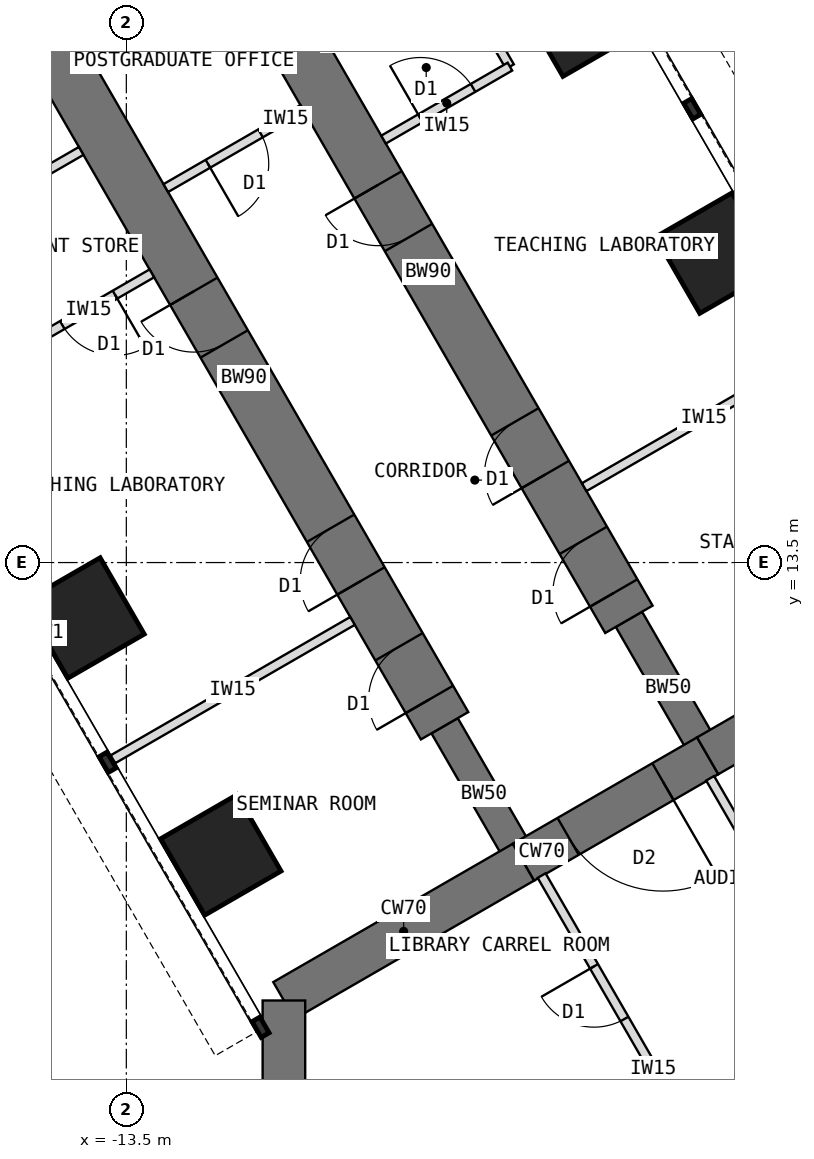
"""IFC4 building model, lengths in metres.
Left out: names, types, materials, properties, quantities, classifications, styles, units other than length and angle.
Written with IfcOpenShell. Run it as: python <this file> out.ifc"""

import sys

from ifc_helpers import new_model, si_unit, direction, frame, frame_2d, origin, origin_2d, place, context, subcontext, project, spatial, rectangle, extrude, element, fill, save


model = new_model("IFC4")
c1 = context("Model", 3, precision=1e-05, world=origin(), true_north=direction((0.0, 1.0)))
c2 = subcontext(c1, "Body", "Model", "MODEL_VIEW")
j1 = project(units=[si_unit("LENGTHUNIT", "METRE"), si_unit("PLANEANGLEUNIT", "RADIAN")], contexts=[c1])
p1 = place(None, origin())
s1 = spatial("IfcSite", under=j1, at=p1, CompositionType="ELEMENT")
p2 = place(p1, origin())
s2 = spatial("IfcBuilding", under=s1, at=p2, CompositionType="ELEMENT")
p3 = place(p2, frame((0.0, 0.0, 56.5)))
s3 = spatial("IfcBuildingStorey", under=s2, at=p3, CompositionType="ELEMENT", Elevation=56.5)
p4 = place(p3, frame((0.0, 12.596, 0.0), z_axis=(0.0, 0.0, 1.0), x_axis=(-0.866011268655, -0.500024481964, 0.0)))
e1 = element("IfcWall", 1, at=p4, inside=s3, PredefinedType="SHEAR", context=c2, shape_type="SweptSolid", body=[
    extrude(rectangle(XDim=4.548, YDim=0.7, at=frame_2d((2.274, 0.0))), origin(), (0.0, 0.0, 1.0), 4.0),
])
p5 = place(p3, frame((-3.939, 10.322, 0.0), z_axis=(0.0, 0.0, 1.0), x_axis=(-0.866019471182, -0.500010275428, 0.0)))
e2 = element("IfcWall", 2, at=p5, inside=s3, PredefinedType="SHEAR", context=c2, shape_type="SweptSolid", body=[
    extrude(rectangle(XDim=3.5, YDim=0.7, at=frame_2d((1.75, 0.0))), origin(), (0.0, 0.0, 1.0), 4.0),
])
p6 = place(p5, frame((0.85, 0.0, 0.0)))
e3 = element("IfcOpeningElement", 3, at=p6, cuts=e2, PredefinedType="OPENING", context=c2, shape_type="SweptSolid", body=[
    extrude(rectangle(XDim=1.8, YDim=2.1, at=frame_2d((0.9, 1.05))), frame((0.0, 0.36, 0.0), z_axis=(0.0, -1.0, 0.0), x_axis=(1.0, 0.0, 0.0)), (0.0, 0.0, 1.0), 0.72),
])
p7 = place(p3, frame((-6.97, 8.572, 0.0), z_axis=(0.0, 0.0, 1.0), x_axis=(-0.866034513004, -0.499984222037, 0.0)))
e4 = element("IfcWall", 4, at=p7, inside=s3, PredefinedType="SHEAR", context=c2, shape_type="SweptSolid", body=[
    extrude(rectangle(XDim=4.548, YDim=0.7, at=frame_2d((2.274, 0.0))), origin(), (0.0, 0.0, 1.0), 4.0),
])
p8 = place(p3, frame((-10.908, 6.298, 0.0), z_axis=(0.0, 0.0, 1.0), x_axis=(0.0, -1.0, 0.0)))
e5 = element("IfcWall", 5, at=p8, inside=s3, PredefinedType="SHEAR", context=c2, shape_type="SweptSolid", body=[
    extrude(rectangle(XDim=12.596, YDim=0.7, at=frame_2d((6.298, 0.0))), origin(), (0.0, 0.0, 1.0), 4.0),
])
p9 = place(p3, frame((-6.97, 8.572, 0.0), z_axis=(0.0, 0.0, 1.0), x_axis=(-0.499988811324, 0.866031863473, 0.0)))
e6 = element("IfcWall", 6, at=p9, inside=s3, PredefinedType="SHEAR", context=c2, shape_type="SweptSolid", body=[
    extrude(rectangle(XDim=2.592, YDim=0.5, at=frame_2d((1.296, 0.0))), origin(), (0.0, 0.0, 1.0), 4.0),
])
p10 = place(p3, frame((-8.266, 10.816, 0.0), z_axis=(0.0, 0.0, 1.0), x_axis=(-0.499996231654, 0.866027579429, 0.0)))
e7 = element("IfcWall", 7, at=p10, inside=s3, PredefinedType="SHEAR", context=c2, shape_type="SweptSolid", body=[
    extrude(rectangle(XDim=13.2, YDim=0.9, at=frame_2d((6.6, 0.0))), origin(), (0.0, 0.0, 1.0), 4.0),
])
p11 = place(p10, frame((0.5, 0.0, 0.0)))
e8 = element("IfcOpeningElement", 8, at=p11, cuts=e7, PredefinedType="OPENING", context=c2, shape_type="SweptSolid", body=[
    extrude(rectangle(XDim=1.0, YDim=2.1, at=frame_2d((0.5, 1.05))), frame((0.0, 0.46, 0.0), z_axis=(0.0, -1.0, 0.0), x_axis=(1.0, 0.0, 0.0)), (0.0, 0.0, 1.0), 0.92),
])
p12 = place(p10, frame((2.75, 0.0, 0.0)))
e9 = element("IfcOpeningElement", 9, at=p12, cuts=e7, PredefinedType="OPENING", context=c2, shape_type="SweptSolid", body=[
    extrude(rectangle(XDim=1.0, YDim=2.1, at=frame_2d((0.5, 1.05))), frame((0.0, 0.46, 0.0), z_axis=(0.0, -1.0, 0.0), x_axis=(1.0, 0.0, 0.0)), (0.0, 0.0, 1.0), 0.92),
])
p13 = place(p10, frame((7.25, 0.0, 0.0)))
e10 = element("IfcOpeningElement", 10, at=p13, cuts=e7, PredefinedType="OPENING", context=c2, shape_type="SweptSolid", body=[
    extrude(rectangle(XDim=1.0, YDim=2.1, at=frame_2d((0.5, 1.05))), frame((0.0, 0.46, 0.0), z_axis=(0.0, -1.0, 0.0), x_axis=(1.0, 0.0, 0.0)), (0.0, 0.0, 1.0), 0.92),
])
p14 = place(p3, frame((-3.939, 10.322, 0.0), z_axis=(0.0, 0.0, 1.0), x_axis=(-0.499918158782, 0.866072649678, 0.0)))
e11 = element("IfcWall", 11, at=p14, inside=s3, PredefinedType="SHEAR", context=c2, shape_type="SweptSolid", body=[
    extrude(rectangle(XDim=2.592, YDim=0.5, at=frame_2d((1.296, 0.0))), origin(), (0.0, 0.0, 1.0), 4.0),
])
p15 = place(p3, frame((-5.234, 12.566, 0.0), z_axis=(0.0, 0.0, 1.0), x_axis=(-0.500010103361, 0.866019570528, 0.0)))
e12 = element("IfcWall", 12, at=p15, inside=s3, PredefinedType="SHEAR", context=c2, shape_type="SweptSolid", body=[
    extrude(rectangle(XDim=13.2, YDim=0.9, at=frame_2d((6.6, 0.0))), origin(), (0.0, 0.0, 1.0), 4.0),
])
p16 = place(p15, frame((0.5, 0.0, 0.0)))
e13 = element("IfcOpeningElement", 13, at=p16, cuts=e12, PredefinedType="OPENING", context=c2, shape_type="SweptSolid", body=[
    extrude(rectangle(XDim=1.0, YDim=2.1, at=frame_2d((0.5, 1.05))), frame((0.0, 0.46, 0.0), z_axis=(0.0, -1.0, 0.0), x_axis=(1.0, 0.0, 0.0)), (0.0, 0.0, 1.0), 0.92),
])
p17 = place(p15, frame((2.75, 0.0, 0.0)))
e14 = element("IfcOpeningElement", 14, at=p17, cuts=e12, PredefinedType="OPENING", context=c2, shape_type="SweptSolid", body=[
    extrude(rectangle(XDim=1.0, YDim=2.1, at=frame_2d((0.5, 1.05))), frame((0.0, 0.46, 0.0), z_axis=(0.0, -1.0, 0.0), x_axis=(1.0, 0.0, 0.0)), (0.0, 0.0, 1.0), 0.92),
])
p18 = place(p15, frame((7.25, 0.0, 0.0)))
e15 = element("IfcOpeningElement", 15, at=p18, cuts=e12, PredefinedType="OPENING", context=c2, shape_type="SweptSolid", body=[
    extrude(rectangle(XDim=1.0, YDim=2.1, at=frame_2d((0.5, 1.05))), frame((0.0, 0.46, 0.0), z_axis=(0.0, -1.0, 0.0), x_axis=(1.0, 0.0, 0.0)), (0.0, 0.0, 1.0), 0.92),
])
for number, where, z_axis, x_axis in (
    (16, (-11.946, 8.691, 0.0), (0.0, 0.0, 1.0), (0.866, 0.5, 0.0)),
    (17, (-14.196, 12.588, 0.0), (0.0, 0.0, 1.0), (0.866, 0.5, 0.0)),
    (18, (-3.804, 18.588, 0.0), (0.0, 0.0, 1.0), (0.866, 0.5, 0.0)),
    (19, (-6.054, 22.486, 0.0), (0.0, 0.0, 1.0), (0.866, 0.5, 0.0)),
):
    element("IfcColumn", number, at=place(p3, frame(where, z_axis=z_axis, x_axis=x_axis)), inside=s3, PredefinedType="COLUMN", context=c2, shape_type="SweptSolid", body=[
        extrude(rectangle(XDim=1.45, YDim=1.45, at=origin_2d()), origin(), (0.0, 0.0, 1.0), 4.0),
    ])
p19 = place(p3, frame((-9.78, 12.54, 0.0), z_axis=(0.0, 0.0, 1.0), x_axis=(-0.866035472144, -0.499982560684, 0.0)))
e20 = element("IfcWall", 20, at=p19, inside=s3, PredefinedType="PARTITIONING", context=c2, shape_type="SweptSolid", body=[
    extrude(rectangle(XDim=4.55, YDim=0.15, at=frame_2d((2.275, 0.0))), origin(), (0.0, 0.0, 1.0), 3.8),
])
p20 = place(p3, frame((-13.08, 18.256, 0.0), z_axis=(0.0, 0.0, 1.0), x_axis=(-0.866024647952, -0.500001309137, 0.0)))
e21 = element("IfcWall", 21, at=p20, inside=s3, PredefinedType="PARTITIONING", context=c2, shape_type="SweptSolid", body=[
    extrude(rectangle(XDim=2.4, YDim=0.15, at=frame_2d((1.2, 0.0))), origin(), (0.0, 0.0, 1.0), 3.8),
])
p21 = place(p20, frame((0.7, 0.0, 0.0)))
e22 = element("IfcOpeningElement", 22, at=p21, cuts=e21, PredefinedType="OPENING", context=c2, shape_type="SweptSolid", body=[
    extrude(rectangle(XDim=1.0, YDim=2.1, at=frame_2d((0.5, 1.05))), frame((0.0, 0.085, 0.0), z_axis=(0.0, -1.0, 0.0), x_axis=(1.0, 0.0, 0.0)), (0.0, 0.0, 1.0), 0.17),
])
p22 = place(p3, frame((-14.243, 20.269, 0.0), z_axis=(0.0, 0.0, 1.0), x_axis=(-0.866006032174, -0.500033551112, 0.0)))
e23 = element("IfcWall", 23, at=p22, inside=s3, PredefinedType="PARTITIONING", context=c2, shape_type="SweptSolid", body=[
    extrude(rectangle(XDim=2.4, YDim=0.15, at=frame_2d((1.2, 0.0))), origin(), (0.0, 0.0, 1.0), 3.8),
])
p23 = place(p3, frame((-5.97, 14.74, 0.0), z_axis=(0.0, 0.0, 1.0), x_axis=(0.866035472144, 0.499982560684, 0.0)))
e24 = element("IfcWall", 24, at=p23, inside=s3, PredefinedType="PARTITIONING", context=c2, shape_type="SweptSolid", body=[
    extrude(rectangle(XDim=4.55, YDim=0.15, at=frame_2d((2.275, 0.0))), origin(), (0.0, 0.0, 1.0), 3.8),
])
p24 = place(p3, frame((-7.191, 21.656, 0.0), z_axis=(0.0, 0.0, 1.0), x_axis=(-0.500077600433, 0.865980596518, 0.0)))
e25 = element("IfcWall", 25, at=p24, inside=s3, PredefinedType="PARTITIONING", context=c2, shape_type="SweptSolid", body=[
    extrude(rectangle(XDim=2.4, YDim=0.15, at=frame_2d((1.2, 0.0))), origin(), (0.0, 0.0, 1.0), 3.8),
])
p25 = place(p3, frame((-9.27, 20.456, 0.0), z_axis=(0.0, 0.0, 1.0), x_axis=(0.866006032174, 0.500033551112, 0.0)))
e26 = element("IfcWall", 26, at=p25, inside=s3, PredefinedType="PARTITIONING", context=c2, shape_type="SweptSolid", body=[
    extrude(rectangle(XDim=2.4, YDim=0.15, at=frame_2d((1.2, 0.0))), origin(), (0.0, 0.0, 1.0), 3.8),
])
p26 = place(p25, frame((0.7, 0.0, 0.0)))
e27 = element("IfcOpeningElement", 27, at=p26, cuts=e26, PredefinedType="OPENING", context=c2, shape_type="SweptSolid", body=[
    extrude(rectangle(XDim=1.0, YDim=2.1, at=frame_2d((0.5, 1.05))), frame((0.0, 0.085, 0.0), z_axis=(0.0, -1.0, 0.0), x_axis=(1.0, 0.0, 0.0)), (0.0, 0.0, 1.0), 0.17),
])
p27 = place(p3, frame((-4.436, 4.483, 0.0), z_axis=(0.0, 0.0, 1.0), x_axis=(-0.500017246033, 0.866015446554, 0.0)))
e28 = element("IfcWall", 28, at=p27, inside=s3, PredefinedType="PARTITIONING", context=c2, shape_type="SweptSolid", body=[
    extrude(rectangle(XDim=4.469, YDim=0.15, at=frame_2d((2.234, 0.0))), origin(), (0.0, 0.0, 1.0), 3.8),
])
p28 = place(p27, frame((1.744, 0.0, 0.0)))
e29 = element("IfcOpeningElement", 29, at=p28, cuts=e28, PredefinedType="OPENING", context=c2, shape_type="SweptSolid", body=[
    extrude(rectangle(XDim=1.0, YDim=2.1, at=frame_2d((0.5, 1.05))), frame((0.0, 0.085, 0.0), z_axis=(0.0, -1.0, 0.0), x_axis=(1.0, 0.0, 0.0)), (0.0, 0.0, 1.0), 0.17),
])
p29 = place(p3, frame((-3.898, 9.952, 0.0), z_axis=(0.0, 0.0, 1.0), x_axis=(0.499999927604, -0.866025445582, 0.0)))
e30 = element("IfcWall", 30, at=p29, inside=s3, PredefinedType="PARTITIONING", context=c2, shape_type="SweptSolid", body=[
    extrude(rectangle(XDim=4.468, YDim=0.15, at=frame_2d((2.234, 0.0))), origin(), (0.0, 0.0, 1.0), 3.8),
])
p30 = place(p29, frame((1.724, 0.0, 0.0)))
e31 = element("IfcOpeningElement", 31, at=p30, cuts=e30, PredefinedType="OPENING", context=c2, shape_type="SweptSolid", body=[
    extrude(rectangle(XDim=1.0, YDim=2.1, at=frame_2d((0.5, 1.05))), frame((0.0, 0.085, 0.0), z_axis=(0.0, -1.0, 0.0), x_axis=(1.0, 0.0, 0.0)), (0.0, 0.0, 1.0), 0.17),
])
p31 = place(p3, frame((-10.599, 20.958, 0.0), z_axis=(0.0, 0.0, 1.0), x_axis=(-0.866021400173, -0.500006934395, 0.0)))
e32 = element("IfcWall", 32, at=p31, inside=s3, PredefinedType="PARTITIONING", context=c2, shape_type="SweptSolid", body=[
    extrude(rectangle(XDim=2.6, YDim=0.15, at=frame_2d((1.3, 0.0))), origin(), (0.0, 0.0, 1.0), 3.8),
])
p32 = place(p31, frame((0.8, 0.0, 0.0)))
e33 = element("IfcOpeningElement", 33, at=p32, cuts=e32, PredefinedType="OPENING", context=c2, shape_type="SweptSolid", body=[
    extrude(rectangle(XDim=1.0, YDim=2.1, at=frame_2d((0.5, 1.05))), frame((0.0, 0.085, 0.0), z_axis=(0.0, -1.0, 0.0), x_axis=(1.0, 0.0, 0.0)), (0.0, 0.0, 1.0), 0.17),
])
p33 = place(p6, origin())
e34 = element("IfcDoor", 34, at=p33, inside=s3, OperationType="DOUBLE_DOOR_DOUBLE_SWING", PredefinedType="DOOR", context=c2, shape_type="SweptSolid", body=[
    extrude(rectangle(XDim=1.72, YDim=2.06, at=frame_2d((0.9, 1.03))), frame((0.0, 0.025, 0.0), z_axis=(0.0, -1.0, 0.0), x_axis=(1.0, 0.0, 0.0)), (0.0, 0.0, 1.0), 0.05),
    extrude(rectangle(XDim=0.04, YDim=2.1, at=frame_2d((0.02, 1.05))), frame((0.0, 0.35, 0.0), z_axis=(0.0, -1.0, 0.0), x_axis=(1.0, 0.0, 0.0)), (0.0, 0.0, 1.0), 0.699),
    extrude(rectangle(XDim=0.04, YDim=2.1, at=frame_2d((1.78, 1.05))), frame((0.0, 0.35, 0.0), z_axis=(0.0, -1.0, 0.0), x_axis=(1.0, 0.0, 0.0)), (0.0, 0.0, 1.0), 0.699),
    extrude(rectangle(XDim=1.72, YDim=0.04, at=frame_2d((0.9, 2.08))), frame((0.0, 0.35, 0.0), z_axis=(0.0, -1.0, 0.0), x_axis=(1.0, 0.0, 0.0)), (0.0, 0.0, 1.0), 0.699),
])
fill(e3, e34)
p34 = place(p21, origin())
e35 = element("IfcDoor", 35, at=p34, inside=s3, OperationType="SINGLE_SWING_LEFT", PredefinedType="DOOR", context=c2, shape_type="SweptSolid", body=[
    extrude(rectangle(XDim=1.0, YDim=2.1, at=frame_2d((0.5, 1.05))), frame((0.0, 0.025, 0.0), z_axis=(0.0, -1.0, 0.0), x_axis=(1.0, 0.0, 0.0)), (0.0, 0.0, 1.0), 0.05),
])
fill(e22, e35)
p35 = place(p26, origin())
e36 = element("IfcDoor", 36, at=p35, inside=s3, OperationType="SINGLE_SWING_LEFT", PredefinedType="DOOR", context=c2, shape_type="SweptSolid", body=[
    extrude(rectangle(XDim=1.0, YDim=2.1, at=frame_2d((0.5, 1.05))), frame((0.0, 0.025, 0.0), z_axis=(0.0, -1.0, 0.0), x_axis=(1.0, 0.0, 0.0)), (0.0, 0.0, 1.0), 0.05),
])
fill(e27, e36)
p36 = place(p28, origin())
e37 = element("IfcDoor", 37, at=p36, inside=s3, OperationType="SINGLE_SWING_RIGHT", PredefinedType="DOOR", context=c2, shape_type="SweptSolid", body=[
    extrude(rectangle(XDim=1.0, YDim=2.1, at=frame_2d((0.5, 1.05))), frame((0.0, 0.025, 0.0), z_axis=(0.0, -1.0, 0.0), x_axis=(1.0, 0.0, 0.0)), (0.0, 0.0, 1.0), 0.05),
])
fill(e29, e37)
p37 = place(p32, origin())
e38 = element("IfcDoor", 38, at=p37, inside=s3, OperationType="SINGLE_SWING_RIGHT", PredefinedType="DOOR", context=c2, shape_type="SweptSolid", body=[
    extrude(rectangle(XDim=1.0, YDim=2.1, at=frame_2d((0.5, 1.05))), frame((0.0, 0.025, 0.0), z_axis=(0.0, -1.0, 0.0), x_axis=(1.0, 0.0, 0.0)), (0.0, 0.0, 1.0), 0.05),
])
fill(e33, e38)
p38 = place(p11, origin())
e39 = element("IfcDoor", 39, at=p38, inside=s3, OperationType="SINGLE_SWING_LEFT", PredefinedType="DOOR", context=c2, shape_type="SweptSolid", body=[
    extrude(rectangle(XDim=0.92, YDim=2.06, at=frame_2d((0.5, 1.03))), frame((0.0, 0.025, 0.0), z_axis=(0.0, -1.0, 0.0), x_axis=(1.0, 0.0, 0.0)), (0.0, 0.0, 1.0), 0.05),
    extrude(rectangle(XDim=0.04, YDim=2.1, at=frame_2d((0.02, 1.05))), frame((0.0, 0.45, 0.0), z_axis=(0.0, -1.0, 0.0), x_axis=(1.0, 0.0, 0.0)), (0.0, 0.0, 1.0), 0.899),
    extrude(rectangle(XDim=0.04, YDim=2.1, at=frame_2d((0.98, 1.05))), frame((0.0, 0.45, 0.0), z_axis=(0.0, -1.0, 0.0), x_axis=(1.0, 0.0, 0.0)), (0.0, 0.0, 1.0), 0.899),
    extrude(rectangle(XDim=0.92, YDim=0.04, at=frame_2d((0.5, 2.08))), frame((0.0, 0.45, 0.0), z_axis=(0.0, -1.0, 0.0), x_axis=(1.0, 0.0, 0.0)), (0.0, 0.0, 1.0), 0.899),
])
fill(e8, e39)
p39 = place(p12, origin())
e40 = element("IfcDoor", 40, at=p39, inside=s3, OperationType="SINGLE_SWING_LEFT", PredefinedType="DOOR", context=c2, shape_type="SweptSolid", body=[
    extrude(rectangle(XDim=0.92, YDim=2.06, at=frame_2d((0.5, 1.03))), frame((0.0, 0.025, 0.0), z_axis=(0.0, -1.0, 0.0), x_axis=(1.0, 0.0, 0.0)), (0.0, 0.0, 1.0), 0.05),
    extrude(rectangle(XDim=0.04, YDim=2.1, at=frame_2d((0.02, 1.05))), frame((0.0, 0.45, 0.0), z_axis=(0.0, -1.0, 0.0), x_axis=(1.0, 0.0, 0.0)), (0.0, 0.0, 1.0), 0.899),
    extrude(rectangle(XDim=0.04, YDim=2.1, at=frame_2d((0.98, 1.05))), frame((0.0, 0.45, 0.0), z_axis=(0.0, -1.0, 0.0), x_axis=(1.0, 0.0, 0.0)), (0.0, 0.0, 1.0), 0.899),
    extrude(rectangle(XDim=0.92, YDim=0.04, at=frame_2d((0.5, 2.08))), frame((0.0, 0.45, 0.0), z_axis=(0.0, -1.0, 0.0), x_axis=(1.0, 0.0, 0.0)), (0.0, 0.0, 1.0), 0.899),
])
fill(e9, e40)
p40 = place(p13, origin())
e41 = element("IfcDoor", 41, at=p40, inside=s3, OperationType="SINGLE_SWING_RIGHT", PredefinedType="DOOR", context=c2, shape_type="SweptSolid", body=[
    extrude(rectangle(XDim=0.92, YDim=2.06, at=frame_2d((0.5, 1.03))), frame((0.0, 0.025, 0.0), z_axis=(0.0, -1.0, 0.0), x_axis=(1.0, 0.0, 0.0)), (0.0, 0.0, 1.0), 0.05),
    extrude(rectangle(XDim=0.04, YDim=2.1, at=frame_2d((0.02, 1.05))), frame((0.0, 0.45, 0.0), z_axis=(0.0, -1.0, 0.0), x_axis=(1.0, 0.0, 0.0)), (0.0, 0.0, 1.0), 0.899),
    extrude(rectangle(XDim=0.04, YDim=2.1, at=frame_2d((0.98, 1.05))), frame((0.0, 0.45, 0.0), z_axis=(0.0, -1.0, 0.0), x_axis=(1.0, 0.0, 0.0)), (0.0, 0.0, 1.0), 0.899),
    extrude(rectangle(XDim=0.92, YDim=0.04, at=frame_2d((0.5, 2.08))), frame((0.0, 0.45, 0.0), z_axis=(0.0, -1.0, 0.0), x_axis=(1.0, 0.0, 0.0)), (0.0, 0.0, 1.0), 0.899),
])
fill(e10, e41)
p41 = place(p16, origin())
e42 = element("IfcDoor", 42, at=p41, inside=s3, OperationType="SINGLE_SWING_LEFT", PredefinedType="DOOR", context=c2, shape_type="SweptSolid", body=[
    extrude(rectangle(XDim=0.92, YDim=2.06, at=frame_2d((0.5, 1.03))), frame((0.0, 0.025, 0.0), z_axis=(0.0, -1.0, 0.0), x_axis=(1.0, 0.0, 0.0)), (0.0, 0.0, 1.0), 0.05),
    extrude(rectangle(XDim=0.04, YDim=2.1, at=frame_2d((0.02, 1.05))), frame((0.0, 0.45, 0.0), z_axis=(0.0, -1.0, 0.0), x_axis=(1.0, 0.0, 0.0)), (0.0, 0.0, 1.0), 0.899),
    extrude(rectangle(XDim=0.04, YDim=2.1, at=frame_2d((0.98, 1.05))), frame((0.0, 0.45, 0.0), z_axis=(0.0, -1.0, 0.0), x_axis=(1.0, 0.0, 0.0)), (0.0, 0.0, 1.0), 0.899),
    extrude(rectangle(XDim=0.92, YDim=0.04, at=frame_2d((0.5, 2.08))), frame((0.0, 0.45, 0.0), z_axis=(0.0, -1.0, 0.0), x_axis=(1.0, 0.0, 0.0)), (0.0, 0.0, 1.0), 0.899),
])
fill(e13, e42)
p42 = place(p17, origin())
e43 = element("IfcDoor", 43, at=p42, inside=s3, OperationType="SINGLE_SWING_LEFT", PredefinedType="DOOR", context=c2, shape_type="SweptSolid", body=[
    extrude(rectangle(XDim=0.92, YDim=2.06, at=frame_2d((0.5, 1.03))), frame((0.0, 0.025, 0.0), z_axis=(0.0, -1.0, 0.0), x_axis=(1.0, 0.0, 0.0)), (0.0, 0.0, 1.0), 0.05),
    extrude(rectangle(XDim=0.04, YDim=2.1, at=frame_2d((0.02, 1.05))), frame((0.0, 0.45, 0.0), z_axis=(0.0, -1.0, 0.0), x_axis=(1.0, 0.0, 0.0)), (0.0, 0.0, 1.0), 0.899),
    extrude(rectangle(XDim=0.04, YDim=2.1, at=frame_2d((0.98, 1.05))), frame((0.0, 0.45, 0.0), z_axis=(0.0, -1.0, 0.0), x_axis=(1.0, 0.0, 0.0)), (0.0, 0.0, 1.0), 0.899),
    extrude(rectangle(XDim=0.92, YDim=0.04, at=frame_2d((0.5, 2.08))), frame((0.0, 0.45, 0.0), z_axis=(0.0, -1.0, 0.0), x_axis=(1.0, 0.0, 0.0)), (0.0, 0.0, 1.0), 0.899),
])
fill(e14, e43)
p43 = place(p18, origin())
e44 = element("IfcDoor", 44, at=p43, inside=s3, OperationType="SINGLE_SWING_RIGHT", PredefinedType="DOOR", context=c2, shape_type="SweptSolid", body=[
    extrude(rectangle(XDim=0.92, YDim=2.06, at=frame_2d((0.5, 1.03))), frame((0.0, 0.025, 0.0), z_axis=(0.0, -1.0, 0.0), x_axis=(1.0, 0.0, 0.0)), (0.0, 0.0, 1.0), 0.05),
    extrude(rectangle(XDim=0.04, YDim=2.1, at=frame_2d((0.02, 1.05))), frame((0.0, 0.45, 0.0), z_axis=(0.0, -1.0, 0.0), x_axis=(1.0, 0.0, 0.0)), (0.0, 0.0, 1.0), 0.899),
    extrude(rectangle(XDim=0.04, YDim=2.1, at=frame_2d((0.98, 1.05))), frame((0.0, 0.45, 0.0), z_axis=(0.0, -1.0, 0.0), x_axis=(1.0, 0.0, 0.0)), (0.0, 0.0, 1.0), 0.899),
    extrude(rectangle(XDim=0.92, YDim=0.04, at=frame_2d((0.5, 2.08))), frame((0.0, 0.45, 0.0), z_axis=(0.0, -1.0, 0.0), x_axis=(1.0, 0.0, 0.0)), (0.0, 0.0, 1.0), 0.899),
])
fill(e15, e44)
save(model, sys.argv[1])
